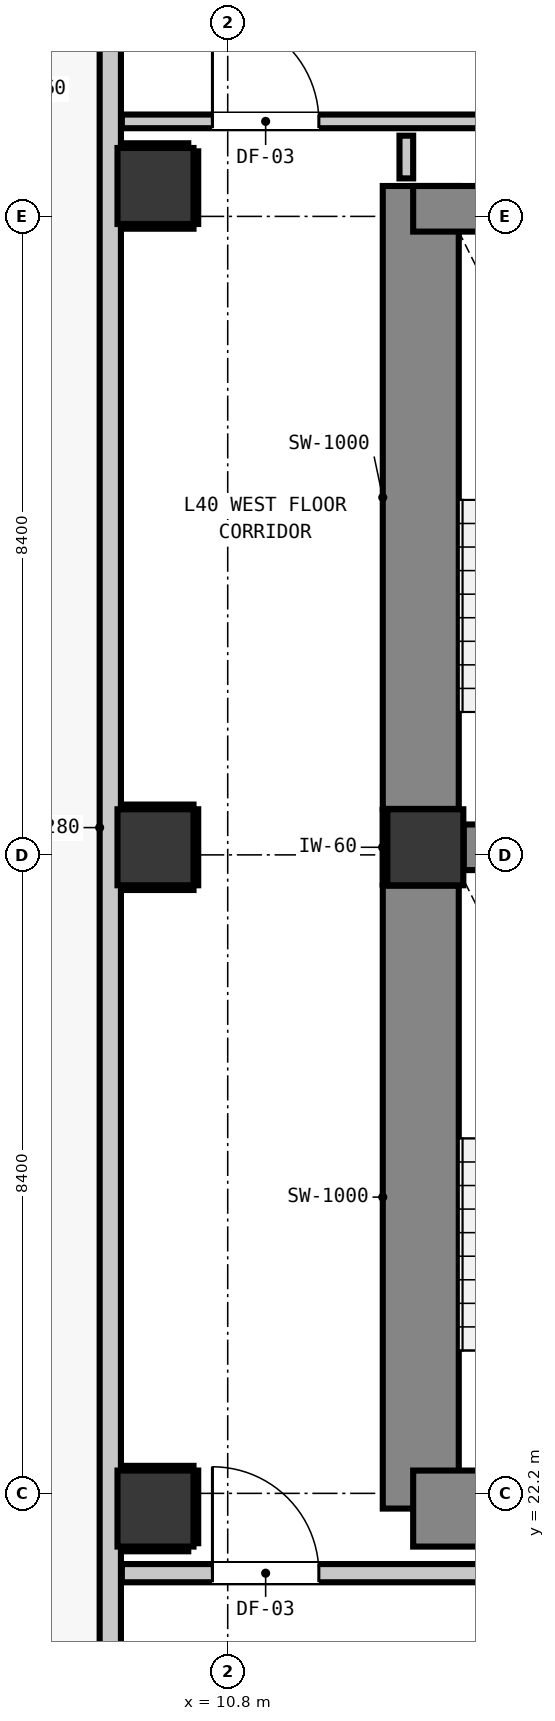
"""IFC4 building model, lengths in metres.
Left out: names, types, materials, properties, quantities, classifications, styles, units other than length and angle.
Written with IfcOpenShell. Run it as: python <this file> out.ifc"""

import sys

from ifc_helpers import new_model, si_unit, direction, frame, frame_2d, origin, origin_2d, place, context, subcontext, project, spatial, rectangle, extrude, element, fill, save


model = new_model("IFC4")
c1 = context("Model", 3, precision=1e-05, world=origin(), true_north=direction((0.0, 1.0)))
c2 = subcontext(c1, "Body", "Model", "MODEL_VIEW")
j1 = project(units=[si_unit("LENGTHUNIT", "METRE"), si_unit("PLANEANGLEUNIT", "RADIAN")], contexts=[c1])
p1 = place(None, origin())
s1 = spatial("IfcSite", under=j1, at=p1, CompositionType="ELEMENT")
p2 = place(p1, origin())
s2 = spatial("IfcBuilding", under=s1, at=p2, CompositionType="ELEMENT")
p3 = place(p2, frame((0.0, 0.0, 139.28)))
s3 = spatial("IfcBuildingStorey", under=s2, at=p3, CompositionType="ELEMENT", Elevation=139.28)
p4 = place(p3, frame((13.4, 30.7, 0.0), z_axis=(0.0, 0.0, 1.0), x_axis=(1.0, 0.0, 0.0)))
e1 = element("IfcColumn", 1, at=p4, inside=s3, PredefinedType="COLUMN", context=c2, shape_type="SweptSolid", body=[
    extrude(rectangle(XDim=1.0, YDim=1.0, at=origin_2d()), origin(), (0.0, 0.0, 1.0), 3.32),
])
p5 = place(p3, frame((13.34, 22.0, 0.0), z_axis=(0.0, 0.0, 1.0), x_axis=(0.0, 1.0, 0.0)))
e2 = element("IfcWall", 2, at=p5, inside=s3, PredefinedType="SHEAR", context=c2, shape_type="SweptSolid", body=[
    extrude(rectangle(XDim=8.195, YDim=1.0, at=frame_2d((4.098, 0.0))), origin(), (0.0, 0.0, 1.0), 3.32),
])
p6 = place(p3, frame((13.34, 31.205, 0.0), z_axis=(0.0, 0.0, 1.0), x_axis=(0.0, 1.0, 0.0)))
e3 = element("IfcWall", 3, at=p6, inside=s3, PredefinedType="SHEAR", context=c2, shape_type="SweptSolid", body=[
    extrude(rectangle(XDim=8.195, YDim=1.0, at=frame_2d((4.097, 0.0))), origin(), (0.0, 0.0, 1.0), 3.32),
])
p7 = place(p3, frame((13.24, 22.0, 0.0), z_axis=(0.0, 0.0, 1.0), x_axis=(1.0, 0.0, 0.0)))
e4 = element("IfcWall", 4, at=p7, inside=s3, PredefinedType="SHEAR", context=c2, shape_type="SweptSolid", body=[
    extrude(rectangle(XDim=4.08, YDim=1.0, at=frame_2d((2.04, 0.0))), origin(), (0.0, 0.0, 1.0), 3.32),
])
p8 = place(p3, frame((13.24, 39.1, 0.0), z_axis=(0.0, 0.0, 1.0), x_axis=(1.0, 0.0, 0.0)))
e5 = element("IfcWall", 5, at=p8, inside=s3, PredefinedType="SHEAR", context=c2, shape_type="SweptSolid", body=[
    extrude(rectangle(XDim=4.08, YDim=0.6, at=frame_2d((2.04, 0.0))), origin(), (0.0, 0.0, 1.0), 3.32),
])
p9 = place(p3, frame((13.905, 30.7, 0.0), z_axis=(0.0, 0.0, 1.0), x_axis=(1.0, 0.0, 0.0)))
e6 = element("IfcWall", 6, at=p9, inside=s3, PredefinedType="SHEAR", context=c2, shape_type="SweptSolid", body=[
    extrude(rectangle(XDim=3.415, YDim=0.6, at=frame_2d((1.708, 0.0))), origin(), (0.0, 0.0, 1.0), 3.32),
])
for number, where, z_axis, x_axis in (
    (7, (9.85, 22.0, 0.0), (0.0, 0.0, 1.0), (1.0, 0.0, 0.0)),
    (8, (9.85, 30.7, 0.0), (0.0, 0.0, 1.0), (1.0, 0.0, 0.0)),
    (9, (9.85, 39.4, 0.0), (0.0, 0.0, 1.0), (1.0, 0.0, 0.0)),
):
    element("IfcColumn", number, at=place(p3, frame(where, z_axis=z_axis, x_axis=x_axis)), inside=s3, PredefinedType="COLUMN", context=c2, shape_type="SweptSolid", body=[
        extrude(rectangle(XDim=1.0, YDim=1.0, at=origin_2d()), origin(), (0.0, 0.0, 1.0), 3.32),
    ])
p10 = place(p3, frame((9.255, 11.355, 0.0), z_axis=(0.0, 0.0, 1.0), x_axis=(0.0, 1.0, 0.0)))
e10 = element("IfcWall", 10, at=p10, inside=s3, PredefinedType="STANDARD", context=c2, shape_type="SweptSolid", body=[
    extrude(rectangle(XDim=32.29, YDim=0.28, at=frame_2d((16.145, 0.0))), origin(), (0.0, 0.0, 1.0), 3.08),
])
p11 = place(p10, frame((5.818, 0.0, 0.0)))
e11 = element("IfcOpeningElement", 11, at=p11, cuts=e10, PredefinedType="OPENING", context=c2, shape_type="SweptSolid", body=[
    extrude(rectangle(XDim=1.0, YDim=2.15, at=frame_2d((0.5, 1.075))), frame((0.0, 0.15, 0.0), z_axis=(0.0, -1.0, 0.0), x_axis=(1.0, 0.0, 0.0)), (0.0, 0.0, 1.0), 0.3),
])
p12 = place(p10, frame((0.619, 0.0, 0.85)))
e12 = element("IfcOpeningElement", 12, at=p12, cuts=e10, PredefinedType="OPENING", context=c2, shape_type="SweptSolid", body=[
    extrude(rectangle(XDim=0.9, YDim=1.5, at=frame_2d((0.45, 0.75))), frame((0.0, 0.15, 0.0), z_axis=(0.0, -1.0, 0.0), x_axis=(1.0, 0.0, 0.0)), (0.0, 0.0, 1.0), 0.3),
])
p13 = place(p3, frame((9.407, 21.15, 0.0), z_axis=(0.0, 0.0, 1.0), x_axis=(1.0, 0.0, 0.0)))
e13 = element("IfcWall", 13, at=p13, inside=s3, PredefinedType="PARTITIONING", context=c2, shape_type="SweptSolid", body=[
    extrude(rectangle(XDim=39.386, YDim=0.24, at=frame_2d((19.693, 0.0))), origin(), (0.0, 0.0, 1.0), 3.08),
])
p14 = place(p13, frame((8.803, 0.0, 0.0)))
e14 = element("IfcOpeningElement", 14, at=p14, cuts=e13, PredefinedType="OPENING", context=c2, shape_type="SweptSolid", body=[
    extrude(rectangle(XDim=1.1, YDim=2.15, at=frame_2d((0.55, 1.075))), frame((0.0, 0.13, 0.0), z_axis=(0.0, -1.0, 0.0), x_axis=(1.0, 0.0, 0.0)), (0.0, 0.0, 1.0), 0.26),
])
p15 = place(p13, frame((1.192, 0.0, 0.0)))
e15 = element("IfcOpeningElement", 15, at=p15, cuts=e13, PredefinedType="OPENING", context=c2, shape_type="SweptSolid", body=[
    extrude(rectangle(XDim=1.4, YDim=2.15, at=frame_2d((0.7, 1.075))), frame((0.0, 0.13, 0.0), z_axis=(0.0, -1.0, 0.0), x_axis=(1.0, 0.0, 0.0)), (0.0, 0.0, 1.0), 0.26),
])
p16 = place(p13, frame((28.643, 0.0, 0.0)))
e16 = element("IfcOpeningElement", 16, at=p16, cuts=e13, PredefinedType="OPENING", context=c2, shape_type="SweptSolid", body=[
    extrude(rectangle(XDim=1.4, YDim=2.15, at=frame_2d((0.7, 1.075))), frame((0.0, 0.13, 0.0), z_axis=(0.0, -1.0, 0.0), x_axis=(1.0, 0.0, 0.0)), (0.0, 0.0, 1.0), 0.26),
])
p17 = place(p3, frame((9.407, 40.25, 0.0), z_axis=(0.0, 0.0, 1.0), x_axis=(1.0, 0.0, 0.0)))
e17 = element("IfcWall", 17, at=p17, inside=s3, PredefinedType="PARTITIONING", context=c2, shape_type="SweptSolid", body=[
    extrude(rectangle(XDim=27.536, YDim=0.18, at=frame_2d((13.768, 0.0))), origin(), (0.0, 0.0, 1.0), 3.08),
])
p18 = place(p17, frame((8.028, 0.0, 0.0)))
e18 = element("IfcOpeningElement", 18, at=p18, cuts=e17, PredefinedType="OPENING", context=c2, shape_type="SweptSolid", body=[
    extrude(rectangle(XDim=1.4, YDim=2.15, at=frame_2d((0.7, 1.075))), frame((0.0, 0.1, 0.0), z_axis=(0.0, -1.0, 0.0), x_axis=(1.0, 0.0, 0.0)), (0.0, 0.0, 1.0), 0.2),
])
p19 = place(p17, frame((1.192, 0.0, 0.0)))
e19 = element("IfcOpeningElement", 19, at=p19, cuts=e17, PredefinedType="OPENING", context=c2, shape_type="SweptSolid", body=[
    extrude(rectangle(XDim=1.4, YDim=2.15, at=frame_2d((0.7, 1.075))), frame((0.0, 0.1, 0.0), z_axis=(0.0, -1.0, 0.0), x_axis=(1.0, 0.0, 0.0)), (0.0, 0.0, 1.0), 0.2),
])
p20 = place(p3, frame((13.15, 39.5, 0.0), z_axis=(0.0, 0.0, 1.0), x_axis=(0.0, 1.0, 0.0)))
e20 = element("IfcWall", 20, at=p20, inside=s3, PredefinedType="PARTITIONING", context=c2, shape_type="SweptSolid", body=[
    extrude(rectangle(XDim=0.562, YDim=0.18, at=frame_2d((0.281, 0.0))), origin(), (0.0, 0.0, 1.0), 2.315),
])
p21 = place(p3, frame((12.868, 30.21, 0.0), z_axis=(0.0, 0.0, 1.0), x_axis=(0.0, 1.0, 0.0)))
e21 = element("IfcWall", 21, at=p21, inside=s3, PredefinedType="PARTITIONING", context=c2, shape_type="SweptSolid", body=[
    extrude(rectangle(XDim=0.98, YDim=0.06, at=frame_2d((0.49, 0.0))), origin(), (0.0, 0.0, 1.0), 1.45),
])
p22 = place(p3, frame((9.41, 21.468, 0.0), z_axis=(0.0, 0.0, 1.0), x_axis=(1.0, 0.0, 0.0)))
e22 = element("IfcWall", 22, at=p22, inside=s3, PredefinedType="PARTITIONING", context=c2, shape_type="SweptSolid", body=[
    extrude(rectangle(XDim=0.871, YDim=0.06, at=frame_2d((0.436, 0.0))), origin(), (0.0, 0.0, 1.0), 1.45),
])
p23 = place(p3, frame((9.41, 22.532, 0.0), z_axis=(0.0, 0.0, 1.0), x_axis=(1.0, 0.0, 0.0)))
e23 = element("IfcWall", 23, at=p23, inside=s3, PredefinedType="PARTITIONING", context=c2, shape_type="SweptSolid", body=[
    extrude(rectangle(XDim=0.94, YDim=0.06, at=frame_2d((0.47, 0.0))), origin(), (0.0, 0.0, 1.0), 1.45),
])
p24 = place(p3, frame((10.382, 21.544, 0.0), z_axis=(0.0, 0.0, 1.0), x_axis=(0.0, 1.0, 0.0)))
e24 = element("IfcWall", 24, at=p24, inside=s3, PredefinedType="PARTITIONING", context=c2, shape_type="SweptSolid", body=[
    extrude(rectangle(XDim=0.956, YDim=0.06, at=frame_2d((0.478, 0.0))), origin(), (0.0, 0.0, 1.0), 1.45),
])
for number, where, z_axis, x_axis in (
    (25, (9.41, 30.168, 0.0), (0.0, 0.0, 1.0), (1.0, 0.0, 0.0)),
    (26, (9.41, 31.232, 0.0), (0.0, 0.0, 1.0), (1.0, 0.0, 0.0)),
):
    element("IfcWall", number, at=place(p3, frame(where, z_axis=z_axis, x_axis=x_axis)), inside=s3, PredefinedType="PARTITIONING", context=c2, shape_type="SweptSolid", body=[
        extrude(rectangle(XDim=0.94, YDim=0.06, at=frame_2d((0.47, 0.0))), origin(), (0.0, 0.0, 1.0), 1.45),
    ])
p25 = place(p3, frame((10.382, 30.2, 0.0), z_axis=(0.0, 0.0, 1.0), x_axis=(0.0, 1.0, 0.0)))
e27 = element("IfcWall", 27, at=p25, inside=s3, PredefinedType="PARTITIONING", context=c2, shape_type="SweptSolid", body=[
    extrude(rectangle(XDim=1.0, YDim=0.06, at=frame_2d((0.5, 0.0))), origin(), (0.0, 0.0, 1.0), 1.45),
])
p26 = place(p3, frame((9.41, 38.868, 0.0), z_axis=(0.0, 0.0, 1.0), x_axis=(1.0, 0.0, 0.0)))
e28 = element("IfcWall", 28, at=p26, inside=s3, PredefinedType="PARTITIONING", context=c2, shape_type="SweptSolid", body=[
    extrude(rectangle(XDim=0.94, YDim=0.06, at=frame_2d((0.47, 0.0))), origin(), (0.0, 0.0, 1.0), 1.45),
])
p27 = place(p3, frame((9.41, 39.932, 0.0), z_axis=(0.0, 0.0, 1.0), x_axis=(1.0, 0.0, 0.0)))
e29 = element("IfcWall", 29, at=p27, inside=s3, PredefinedType="PARTITIONING", context=c2, shape_type="SweptSolid", body=[
    extrude(rectangle(XDim=0.871, YDim=0.06, at=frame_2d((0.436, 0.0))), origin(), (0.0, 0.0, 1.0), 1.45),
])
p28 = place(p3, frame((10.382, 38.9, 0.0), z_axis=(0.0, 0.0, 1.0), x_axis=(0.0, 1.0, 0.0)))
e30 = element("IfcWall", 30, at=p28, inside=s3, PredefinedType="PARTITIONING", context=c2, shape_type="SweptSolid", body=[
    extrude(rectangle(XDim=0.956, YDim=0.06, at=frame_2d((0.478, 0.0))), origin(), (0.0, 0.0, 1.0), 1.45),
])
p29 = place(p15, origin())
e31 = element("IfcDoor", 31, at=p29, inside=s3, OperationType="SINGLE_SWING_LEFT", PredefinedType="DOOR", context=c2, shape_type="SweptSolid", body=[
    extrude(rectangle(XDim=1.4, YDim=2.15, at=frame_2d((0.7, 1.075))), frame((0.0, 0.025, 0.0), z_axis=(0.0, -1.0, 0.0), x_axis=(1.0, 0.0, 0.0)), (0.0, 0.0, 1.0), 0.05),
])
fill(e15, e31)
p30 = place(p19, origin())
e32 = element("IfcDoor", 32, at=p30, inside=s3, OperationType="SINGLE_SWING_LEFT", PredefinedType="DOOR", context=c2, shape_type="SweptSolid", body=[
    extrude(rectangle(XDim=1.4, YDim=2.15, at=frame_2d((0.7, 1.075))), frame((0.0, 0.025, 0.0), z_axis=(0.0, -1.0, 0.0), x_axis=(1.0, 0.0, 0.0)), (0.0, 0.0, 1.0), 0.05),
])
fill(e19, e32)
save(model, sys.argv[1])
